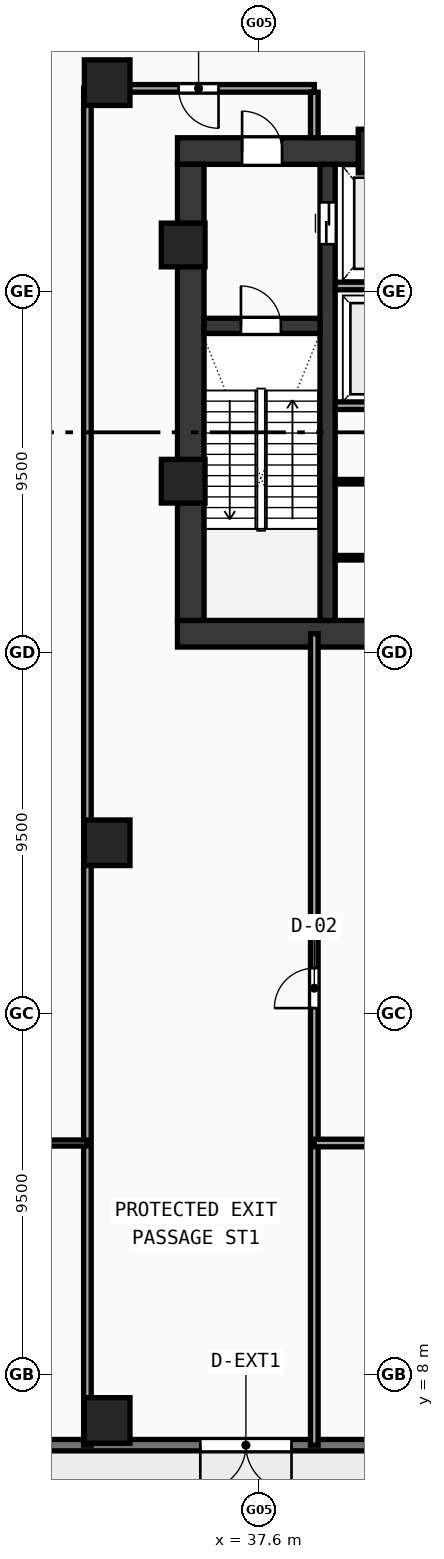
"""IFC4 building model, lengths in metres.
Left out: names, types, materials, properties, quantities, classifications, styles, units other than length and angle.
Written with IfcOpenShell. Run it as: python <this file> out.ifc"""

import sys

from ifc_helpers import new_model, si_unit, direction, frame, frame_2d, origin, origin_with_axes, origin_2d, place, context, subcontext, project, spatial, rectangle, hollow_rectangle, extrude, source, transform, mapped, element, fill, save


model = new_model("IFC4")
c1 = context("Model", 3, precision=1e-05, world=origin(), true_north=direction((0.0, 1.0)))
c2 = subcontext(c1, "Body", "Model", "MODEL_VIEW")
j1 = project(units=[si_unit("LENGTHUNIT", "METRE"), si_unit("PLANEANGLEUNIT", "RADIAN")], contexts=[c1])
p1 = place(None, origin())
s1 = spatial("IfcSite", under=j1, at=p1, CompositionType="ELEMENT")
p2 = place(p1, origin())
s2 = spatial("IfcBuilding", under=s1, at=p2, CompositionType="ELEMENT")
p3 = place(p2, origin())
s3 = spatial("IfcBuildingStorey", under=s2, at=p3, CompositionType="ELEMENT", Elevation=0.0)
p4 = place(p3, frame((35.45, 27.5, 0.0), z_axis=(0.0, 0.0, 1.0), x_axis=(1.0, 0.0, 0.0)))
e1 = element("IfcWall", 1, at=p4, inside=s3, PredefinedType="SHEAR", context=c2, shape_type="SweptSolid", body=[
    extrude(rectangle(XDim=25.1, YDim=0.7, at=frame_2d((12.55, 0.0))), origin(), (0.0, 0.0, 1.0), 4.52),
])
p5 = place(p3, frame((35.45, 40.2, 0.0), z_axis=(0.0, 0.0, 1.0), x_axis=(1.0, 0.0, 0.0)))
e2 = element("IfcWall", 2, at=p5, inside=s3, PredefinedType="SHEAR", context=c2, shape_type="SweptSolid", body=[
    extrude(rectangle(XDim=11.35, YDim=0.7, at=frame_2d((5.675, 0.0))), origin(), (0.0, 0.0, 1.0), 4.52),
])
p6 = place(p5, frame((1.7, 0.0, 0.0)))
e3 = element("IfcOpeningElement", 3, at=p6, cuts=e2, PredefinedType="OPENING", context=c2, shape_type="SweptSolid", body=[
    extrude(rectangle(XDim=1.05, YDim=2.1, at=frame_2d((0.525, 1.05))), frame((0.0, 0.36, 0.0), z_axis=(0.0, -1.0, 0.0), x_axis=(1.0, 0.0, 0.0)), (0.0, 0.0, 1.0), 0.72),
])
p7 = place(p3, frame((35.8, 27.85, 0.0), z_axis=(0.0, 0.0, 1.0), x_axis=(0.0, 1.0, 0.0)))
e4 = element("IfcWall", 4, at=p7, inside=s3, PredefinedType="SHEAR", context=c2, shape_type="SweptSolid", body=[
    extrude(rectangle(XDim=12.0, YDim=0.7, at=frame_2d((6.0, 0.0))), origin(), (0.0, 0.0, 1.0), 4.52),
])
p8 = place(p3, frame((39.4, 27.85, 0.0), z_axis=(0.0, 0.0, 1.0), x_axis=(0.0, 1.0, 0.0)))
e5 = element("IfcWall", 5, at=p8, inside=s3, PredefinedType="SHEAR", context=c2, shape_type="SweptSolid", body=[
    extrude(rectangle(XDim=12.0, YDim=0.4, at=frame_2d((6.0, 0.0))), origin(), (0.0, 0.0, 1.0), 4.52),
])
p9 = place(p8, frame((9.9, 0.0, 0.0)))
e6 = element("IfcOpeningElement", 6, at=p9, cuts=e5, PredefinedType="OPENING", context=c2, shape_type="SweptSolid", body=[
    extrude(rectangle(XDim=1.1, YDim=2.1, at=frame_2d((0.55, 1.05))), frame((0.0, 0.21, 0.0), z_axis=(0.0, -1.0, 0.0), x_axis=(1.0, 0.0, 0.0)), (0.0, 0.0, 1.0), 0.42),
])
p10 = place(p3, frame((36.15, 35.6, 0.0), z_axis=(0.0, 0.0, 1.0), x_axis=(1.0, 0.0, 0.0)))
e7 = element("IfcWall", 7, at=p10, inside=s3, PredefinedType="SHEAR", context=c2, shape_type="SweptSolid", body=[
    extrude(rectangle(XDim=3.05, YDim=0.4, at=frame_2d((1.525, 0.0))), origin(), (0.0, 0.0, 1.0), 4.52),
])
p11 = place(p10, frame((0.97, 0.0, 0.0)))
e8 = element("IfcOpeningElement", 8, at=p11, cuts=e7, PredefinedType="OPENING", context=c2, shape_type="SweptSolid", body=[
    extrude(rectangle(XDim=1.05, YDim=2.1, at=frame_2d((0.525, 1.05))), frame((0.0, 0.21, 0.0), z_axis=(0.0, -1.0, 0.0), x_axis=(1.0, 0.0, 0.0)), (0.0, 0.0, 1.0), 0.42),
])
m1 = source(origin(), c2, "Body", "SweptSolid", [
    extrude(hollow_rectangle(XDim=1.15, YDim=1.15, WallThickness=0.048, at=origin_2d()), origin(), (0.0, 0.0, 1.0), 4.8),
])
for number, where, z_axis, x_axis in (
    (9, (40.781, 40.2, -0.28), (0.0, 0.0, 1.0), (1.0, 0.0, 0.0)),
    (10, (35.6, 37.729, -0.28), (0.0, 0.0, 1.0), (1.0, 0.0, 0.0)),
    (11, (35.6, 31.513, -0.28), (0.0, 0.0, 1.0), (1.0, 0.0, 0.0)),
):
    element("IfcColumn", number, at=place(p3, frame(where, z_axis=z_axis, x_axis=x_axis)), inside=s3, PredefinedType="COLUMN", context=c2, shape_type="MappedRepresentation", body=[
        mapped(m1, transform((0.0, 0.0, 0.0), scale=1.0)),
    ])
m2 = source(origin(), c2, "Body", "SweptSolid", [
    extrude(hollow_rectangle(XDim=1.2, YDim=1.2, WallThickness=0.05, at=origin_2d()), origin(), (0.0, 0.0, 1.0), 4.8),
])
for number, where, z_axis, x_axis in (
    (12, (33.6, 6.8, -0.28), (0.0, 0.0, 1.0), (1.0, 0.0, 0.0)),
    (13, (33.6, 22.0, -0.28), (0.0, 0.0, 1.0), (1.0, 0.0, 0.0)),
    (14, (33.6, 42.0, -0.28), (0.0, 0.0, 1.0), (1.0, 0.0, 0.0)),
):
    element("IfcColumn", number, at=place(p3, frame(where, z_axis=z_axis, x_axis=x_axis)), inside=s3, PredefinedType="COLUMN", context=c2, shape_type="MappedRepresentation", body=[
        mapped(m2, transform((0.0, 0.0, 0.0), scale=1.0)),
    ])
p12 = place(p3, frame((4.0, 6.15, 0.0), z_axis=(0.0, 0.0, 1.0), x_axis=(1.0, 0.0, 0.0)))
e15 = element("IfcWall", 15, at=p12, inside=s3, PredefinedType="STANDARD", context=c2, shape_type="SweptSolid", body=[
    extrude(rectangle(XDim=88.0, YDim=0.3, at=frame_2d((44.0, 0.0))), origin(), (0.0, 0.0, 1.0), 4.52),
])
p13 = place(p12, frame((32.05, 0.0, 0.0)))
e16 = element("IfcOpeningElement", 16, at=p13, cuts=e15, PredefinedType="OPENING", context=c2, shape_type="SweptSolid", body=[
    extrude(rectangle(XDim=2.4, YDim=2.2, at=frame_2d((1.2, 1.1))), frame((0.0, 0.16, 0.0), z_axis=(0.0, -1.0, 0.0), x_axis=(1.0, 0.0, 0.0)), (0.0, 0.0, 1.0), 0.32),
])
p14 = place(p12, frame((53.55, 0.0, 0.0)))
e17 = element("IfcOpeningElement", 17, at=p14, cuts=e15, PredefinedType="OPENING", context=c2, shape_type="SweptSolid", body=[
    extrude(rectangle(XDim=2.4, YDim=2.2, at=frame_2d((1.2, 1.1))), frame((0.0, 0.16, 0.0), z_axis=(0.0, -1.0, 0.0), x_axis=(1.0, 0.0, 0.0)), (0.0, 0.0, 1.0), 0.32),
])
p15 = place(p12, frame((68.0, 0.0, 0.0)))
e18 = element("IfcOpeningElement", 18, at=p15, cuts=e15, PredefinedType="OPENING", context=c2, shape_type="SweptSolid", body=[
    extrude(rectangle(XDim=2.4, YDim=2.2, at=frame_2d((1.2, 1.1))), frame((0.0, 0.16, 0.0), z_axis=(0.0, -1.0, 0.0), x_axis=(1.0, 0.0, 0.0)), (0.0, 0.0, 1.0), 0.32),
])
p16 = place(p12, frame((78.0, 0.0, 0.0)))
e19 = element("IfcOpeningElement", 19, at=p16, cuts=e15, PredefinedType="OPENING", context=c2, shape_type="SweptSolid", body=[
    extrude(rectangle(XDim=2.4, YDim=2.2, at=frame_2d((1.2, 1.1))), frame((0.0, 0.16, 0.0), z_axis=(0.0, -1.0, 0.0), x_axis=(1.0, 0.0, 0.0)), (0.0, 0.0, 1.0), 0.32),
])
p17 = place(p12, frame((9.0, 0.0, 0.9)))
e20 = element("IfcOpeningElement", 20, at=p17, cuts=e15, PredefinedType="OPENING", context=c2, shape_type="SweptSolid", body=[
    extrude(rectangle(XDim=2.4, YDim=1.8, at=frame_2d((1.2, 0.9))), frame((0.0, 0.16, 0.0), z_axis=(0.0, -1.0, 0.0), x_axis=(1.0, 0.0, 0.0)), (0.0, 0.0, 1.0), 0.32),
])
p18 = place(p12, frame((20.5, 0.0, 0.9)))
e21 = element("IfcOpeningElement", 21, at=p18, cuts=e15, PredefinedType="OPENING", context=c2, shape_type="SweptSolid", body=[
    extrude(rectangle(XDim=2.4, YDim=1.8, at=frame_2d((1.2, 0.9))), frame((0.0, 0.16, 0.0), z_axis=(0.0, -1.0, 0.0), x_axis=(1.0, 0.0, 0.0)), (0.0, 0.0, 1.0), 0.32),
])
p19 = place(p12, frame((39.0, 0.0, 0.9)))
e22 = element("IfcOpeningElement", 22, at=p19, cuts=e15, PredefinedType="OPENING", context=c2, shape_type="SweptSolid", body=[
    extrude(rectangle(XDim=2.4, YDim=1.8, at=frame_2d((1.2, 0.9))), frame((0.0, 0.16, 0.0), z_axis=(0.0, -1.0, 0.0), x_axis=(1.0, 0.0, 0.0)), (0.0, 0.0, 1.0), 0.32),
])
p20 = place(p12, frame((48.0, 0.0, 0.9)))
e23 = element("IfcOpeningElement", 23, at=p20, cuts=e15, PredefinedType="OPENING", context=c2, shape_type="SweptSolid", body=[
    extrude(rectangle(XDim=2.4, YDim=1.8, at=frame_2d((1.2, 0.9))), frame((0.0, 0.16, 0.0), z_axis=(0.0, -1.0, 0.0), x_axis=(1.0, 0.0, 0.0)), (0.0, 0.0, 1.0), 0.32),
])
p21 = place(p12, frame((61.5, 0.0, 0.9)))
e24 = element("IfcOpeningElement", 24, at=p21, cuts=e15, PredefinedType="OPENING", context=c2, shape_type="SweptSolid", body=[
    extrude(rectangle(XDim=2.4, YDim=1.8, at=frame_2d((1.2, 0.9))), frame((0.0, 0.16, 0.0), z_axis=(0.0, -1.0, 0.0), x_axis=(1.0, 0.0, 0.0)), (0.0, 0.0, 1.0), 0.32),
])
for number, where, z_axis, x_axis in (
    (25, (39.6, 36.65, 0.0), (0.0, 0.0, 1.0), (1.0, 0.0, 0.0)),
    (26, (39.6, 33.5, 0.0), (0.0, 0.0, 1.0), (1.0, 0.0, 0.0)),
):
    element("IfcWall", number, at=place(p3, frame(where, z_axis=z_axis, x_axis=x_axis)), inside=s3, PredefinedType="SOLIDWALL", context=c2, shape_type="SweptSolid", body=[
        extrude(rectangle(XDim=2.72, YDim=0.2, at=frame_2d((1.36, 0.0))), origin(), (0.0, 0.0, 1.0), 4.52),
    ])
for number, where, z_axis, x_axis in (
    (27, (39.6, 29.5, 0.0), (0.0, 0.0, 1.0), (1.0, 0.0, 0.0)),
    (28, (39.6, 31.5, 0.0), (0.0, 0.0, 1.0), (1.0, 0.0, 0.0)),
):
    element("IfcWall", number, at=place(p3, frame(where, z_axis=z_axis, x_axis=x_axis)), inside=s3, PredefinedType="PARTITIONING", context=c2, shape_type="SweptSolid", body=[
        extrude(rectangle(XDim=2.72, YDim=0.12, at=frame_2d((1.36, 0.0))), origin(), (0.0, 0.0, 1.0), 4.52),
    ])
p22 = place(p3, frame((33.08, 6.15, 0.0), z_axis=(0.0, 0.0, 1.0), x_axis=(0.0, 1.0, 0.0)))
e29 = element("IfcWall", 29, at=p22, inside=s3, PredefinedType="SOLIDWALL", context=c2, shape_type="SweptSolid", body=[
    extrude(rectangle(XDim=35.7, YDim=0.2, at=frame_2d((17.85, 0.0))), origin(), (0.0, 0.0, 1.0), 3.62),
])
p23 = place(p3, frame((33.08, 41.85, 0.0), z_axis=(0.0, 0.0, 1.0), x_axis=(1.0, 0.0, 0.0)))
e30 = element("IfcWall", 30, at=p23, inside=s3, PredefinedType="SOLIDWALL", context=c2, shape_type="SweptSolid", body=[
    extrude(rectangle(XDim=5.97, YDim=0.2, at=frame_2d((2.985, 0.0))), origin(), (0.0, 0.0, 1.0), 3.62),
])
p24 = place(p23, frame((2.4, 0.0, 0.0)))
e31 = element("IfcOpeningElement", 31, at=p24, cuts=e30, PredefinedType="OPENING", context=c2, shape_type="SweptSolid", body=[
    extrude(rectangle(XDim=1.05, YDim=2.1, at=frame_2d((0.525, 1.05))), frame((0.0, 0.11, 0.0), z_axis=(0.0, -1.0, 0.0), x_axis=(1.0, 0.0, 0.0)), (0.0, 0.0, 1.0), 0.22),
])
p25 = place(p3, frame((39.05, 40.55, 0.0), z_axis=(0.0, 0.0, 1.0), x_axis=(0.0, 1.0, 0.0)))
e32 = element("IfcWall", 32, at=p25, inside=s3, PredefinedType="SOLIDWALL", context=c2, shape_type="SweptSolid", body=[
    extrude(rectangle(XDim=1.2, YDim=0.2, at=frame_2d((0.6, 0.0))), origin(), (0.0, 0.0, 1.0), 4.52),
])
p26 = place(p3, frame((39.05, 6.15, 0.0), z_axis=(0.0, 0.0, 1.0), x_axis=(0.0, 1.0, 0.0)))
e33 = element("IfcWall", 33, at=p26, inside=s3, PredefinedType="SOLIDWALL", context=c2, shape_type="SweptSolid", body=[
    extrude(rectangle(XDim=21.35, YDim=0.2, at=frame_2d((10.675, 0.0))), origin(), (0.0, 0.0, 1.0), 3.62),
])
p27 = place(p26, frame((11.5, 0.0, 0.0)))
e34 = element("IfcOpeningElement", 34, at=p27, cuts=e33, PredefinedType="OPENING", context=c2, shape_type="SweptSolid", body=[
    extrude(rectangle(XDim=1.05, YDim=2.1, at=frame_2d((0.525, 1.05))), frame((0.0, 0.11, 0.0), z_axis=(0.0, -1.0, 0.0), x_axis=(1.0, 0.0, 0.0)), (0.0, 0.0, 1.0), 0.22),
])
p28 = place(p3, frame((39.05, 14.1, 0.0), z_axis=(0.0, 0.0, 1.0), x_axis=(1.0, 0.0, 0.0)))
e35 = element("IfcWall", 35, at=p28, inside=s3, PredefinedType="SOLIDWALL", context=c2, shape_type="SweptSolid", body=[
    extrude(rectangle(XDim=17.9, YDim=0.2, at=frame_2d((8.95, 0.0))), origin(), (0.0, 0.0, 1.0), 4.52),
])
p29 = place(p28, frame((3.5, 0.0, 0.0)))
e36 = element("IfcOpeningElement", 36, at=p29, cuts=e35, PredefinedType="OPENING", context=c2, shape_type="SweptSolid", body=[
    extrude(rectangle(XDim=1.05, YDim=2.1, at=frame_2d((0.525, 1.05))), frame((0.0, 0.11, 0.0), z_axis=(0.0, -1.0, 0.0), x_axis=(1.0, 0.0, 0.0)), (0.0, 0.0, 1.0), 0.22),
])
p30 = place(p28, frame((12.5, 0.0, 0.0)))
e37 = element("IfcOpeningElement", 37, at=p30, cuts=e35, PredefinedType="OPENING", context=c2, shape_type="SweptSolid", body=[
    extrude(rectangle(XDim=0.92, YDim=2.1, at=frame_2d((0.46, 1.05))), frame((0.0, 0.11, 0.0), z_axis=(0.0, -1.0, 0.0), x_axis=(1.0, 0.0, 0.0)), (0.0, 0.0, 1.0), 0.22),
])
p31 = place(p3, frame((4.08, 14.1, 0.0), z_axis=(0.0, 0.0, 1.0), x_axis=(1.0, 0.0, 0.0)))
e38 = element("IfcWall", 38, at=p31, inside=s3, PredefinedType="PARTITIONING", context=c2, shape_type="SweptSolid", body=[
    extrude(rectangle(XDim=29.0, YDim=0.16, at=frame_2d((14.5, 0.0))), origin(), (0.0, 0.0, 1.0), 3.62),
])
p32 = place(p31, frame((6.0, 0.0, 0.0)))
e39 = element("IfcOpeningElement", 39, at=p32, cuts=e38, PredefinedType="OPENING", context=c2, shape_type="SweptSolid", body=[
    extrude(rectangle(XDim=0.94, YDim=2.1, at=frame_2d((0.47, 1.05))), frame((0.0, 0.09, 0.0), z_axis=(0.0, -1.0, 0.0), x_axis=(1.0, 0.0, 0.0)), (0.0, 0.0, 1.0), 0.18),
])
p33 = place(p31, frame((18.4, 0.0, 0.0)))
e40 = element("IfcOpeningElement", 40, at=p33, cuts=e38, PredefinedType="OPENING", context=c2, shape_type="SweptSolid", body=[
    extrude(rectangle(XDim=0.94, YDim=2.1, at=frame_2d((0.47, 1.05))), frame((0.0, 0.09, 0.0), z_axis=(0.0, -1.0, 0.0), x_axis=(1.0, 0.0, 0.0)), (0.0, 0.0, 1.0), 0.18),
])
p34 = place(p31, frame((24.5, 0.0, 0.0)))
e41 = element("IfcOpeningElement", 41, at=p34, cuts=e38, PredefinedType="OPENING", context=c2, shape_type="SweptSolid", body=[
    extrude(rectangle(XDim=0.92, YDim=2.1, at=frame_2d((0.46, 1.05))), frame((0.0, 0.09, 0.0), z_axis=(0.0, -1.0, 0.0), x_axis=(1.0, 0.0, 0.0)), (0.0, 0.0, 1.0), 0.18),
])
m3 = source(origin(), c2, "Body", "SweptSolid", [
    extrude(rectangle(XDim=2.4, YDim=2.2, at=frame_2d((1.2, 1.1))), frame((0.0, 0.025, 0.0), z_axis=(0.0, -1.0, 0.0), x_axis=(1.0, 0.0, 0.0)), (0.0, 0.0, 1.0), 0.05),
])
p35 = place(p13, frame((2.4, 0.0, 0.0), z_axis=(0.0, 0.0, 1.0), x_axis=(-1.0, 0.0, 0.0)))
e42 = element("IfcDoor", 42, at=p35, inside=s3, OperationType="DOUBLE_DOOR_SINGLE_SWING", PredefinedType="DOOR", context=c2, shape_type="MappedRepresentation", body=[
    mapped(m3, transform((0.0, 0.0, 0.0), scale=1.0)),
])
fill(e16, e42)
m4 = source(origin(), c2, "Body", "SweptSolid", [
    extrude(rectangle(XDim=1.05, YDim=2.1, at=frame_2d((0.525, 1.05))), frame((0.0, 0.025, 0.0), z_axis=(0.0, -1.0, 0.0), x_axis=(1.0, 0.0, 0.0)), (0.0, 0.0, 1.0), 0.05),
])
p36 = place(p11, origin_with_axes())
e43 = element("IfcDoor", 43, at=p36, inside=s3, OperationType="SINGLE_SWING_LEFT", PredefinedType="DOOR", context=c2, shape_type="MappedRepresentation", body=[
    mapped(m4, transform((0.0, 0.0, 0.0), scale=1.0)),
])
fill(e8, e43)
p37 = place(p6, origin_with_axes())
e44 = element("IfcDoor", 44, at=p37, inside=s3, OperationType="SINGLE_SWING_LEFT", PredefinedType="DOOR", context=c2, shape_type="MappedRepresentation", body=[
    mapped(m4, transform((0.0, 0.0, 0.0), scale=1.0)),
])
fill(e3, e44)
m5 = source(origin(), c2, "Body", "SweptSolid", [
    extrude(rectangle(XDim=1.1, YDim=2.1, at=frame_2d((0.55, 1.05))), frame((0.0, 0.025, 0.0), z_axis=(0.0, -1.0, 0.0), x_axis=(1.0, 0.0, 0.0)), (0.0, 0.0, 1.0), 0.05),
])
p38 = place(p9, frame((1.1, 0.0, 0.0), z_axis=(0.0, 0.0, 1.0), x_axis=(-1.0, 0.0, 0.0)))
e45 = element("IfcDoor", 45, at=p38, inside=s3, OperationType="DOUBLE_DOOR_SLIDING", PredefinedType="DOOR", context=c2, shape_type="MappedRepresentation", body=[
    mapped(m5, transform((0.0, 0.0, 0.0), scale=1.0)),
])
fill(e6, e45)
p39 = place(p24, frame((1.05, 0.0, 0.0), z_axis=(0.0, 0.0, 1.0), x_axis=(-1.0, 0.0, 0.0)))
e46 = element("IfcDoor", 46, at=p39, inside=s3, OperationType="SINGLE_SWING_LEFT", PredefinedType="DOOR", context=c2, shape_type="MappedRepresentation", body=[
    mapped(m4, transform((0.0, 0.0, 0.0), scale=1.0)),
])
fill(e31, e46)
p40 = place(p27, origin_with_axes())
e47 = element("IfcDoor", 47, at=p40, inside=s3, OperationType="SINGLE_SWING_LEFT", PredefinedType="DOOR", context=c2, shape_type="MappedRepresentation", body=[
    mapped(m4, transform((0.0, 0.0, 0.0), scale=1.0)),
])
fill(e34, e47)
save(model, sys.argv[1])
